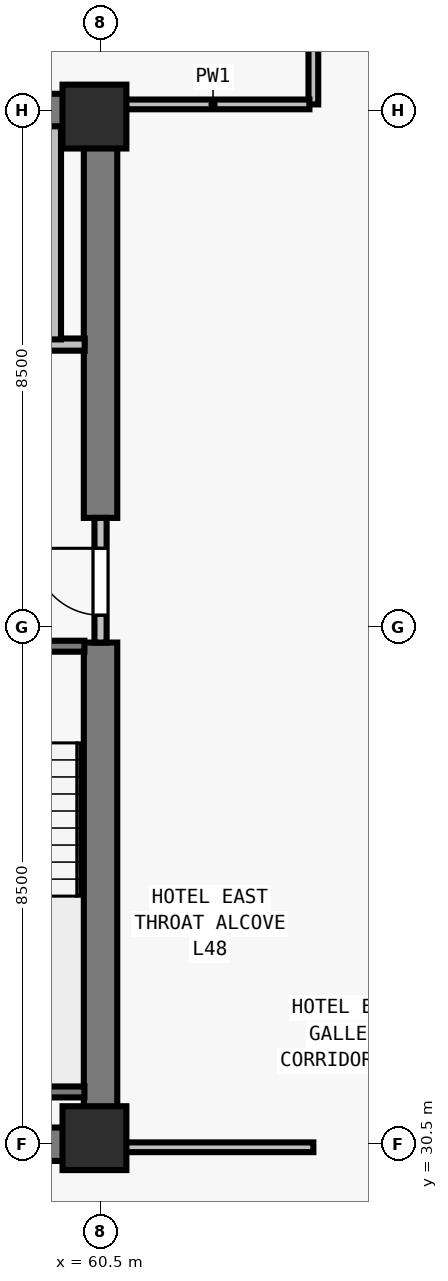
"""IFC4 building model, lengths in metres.
Left out: names, types, materials, properties, quantities, classifications, styles, units other than length and angle.
Written with IfcOpenShell. Run it as: python <this file> out.ifc"""

import sys

from ifc_helpers import new_model, si_unit, direction, frame, frame_2d, origin, origin_2d, place, context, subcontext, project, spatial, rectangle, extrude, element, fill, save


model = new_model("IFC4")
c1 = context("Model", 3, precision=1e-05, world=origin(), true_north=direction((0.0, 1.0)))
c2 = subcontext(c1, "Body", "Model", "MODEL_VIEW")
j1 = project(units=[si_unit("LENGTHUNIT", "METRE"), si_unit("PLANEANGLEUNIT", "RADIAN")], contexts=[c1])
p1 = place(None, origin())
s1 = spatial("IfcSite", under=j1, at=p1, CompositionType="ELEMENT")
p2 = place(p1, origin())
s2 = spatial("IfcBuilding", under=s1, at=p2, CompositionType="ELEMENT")
p3 = place(p2, frame((0.0, 0.0, 176.0)))
s3 = spatial("IfcBuildingStorey", under=s2, at=p3, CompositionType="ELEMENT", Elevation=176.0)
for number, where, z_axis, x_axis in (
    (1, (60.4, 30.6, 0.0), (0.0, 0.0, 1.0), (1.0, 0.0, 0.0)),
    (2, (60.4, 47.4, 0.0), (0.0, 0.0, 1.0), (1.0, 0.0, 0.0)),
):
    element("IfcColumn", number, at=place(p3, frame(where, z_axis=z_axis, x_axis=x_axis)), inside=s3, PredefinedType="COLUMN", context=c2, shape_type="SweptSolid", body=[
        extrude(rectangle(XDim=1.05, YDim=1.05, at=origin_2d()), origin(), (0.0, 0.0, 1.0), 3.5),
    ])
for number, where, z_axis, x_axis in (
    (3, (43.225, 30.5, 0.0), (0.0, 0.0, 1.0), (1.0, 0.0, 0.0)),
    (4, (43.225, 47.5, 0.0), (0.0, 0.0, 1.0), (1.0, 0.0, 0.0)),
):
    element("IfcWall", number, at=place(p3, frame(where, z_axis=z_axis, x_axis=x_axis)), inside=s3, PredefinedType="SHEAR", context=c2, shape_type="SweptSolid", body=[
        extrude(rectangle(XDim=17.55, YDim=0.55, at=frame_2d((8.775, 0.0))), origin(), (0.0, 0.0, 1.0), 3.28),
    ])
p4 = place(p3, frame((60.5, 30.765, 0.0), z_axis=(0.0, 0.0, 1.0), x_axis=(0.0, 1.0, 0.0)))
e5 = element("IfcWall", 5, at=p4, inside=s3, PredefinedType="SHEAR", context=c2, shape_type="SweptSolid", body=[
    extrude(rectangle(XDim=7.985, YDim=0.55, at=frame_2d((3.993, 0.0))), origin(), (0.0, 0.0, 1.0), 3.28),
])
p5 = place(p3, frame((60.5, 40.8, 0.0), z_axis=(0.0, 0.0, 1.0), x_axis=(0.0, 1.0, 0.0)))
e6 = element("IfcWall", 6, at=p5, inside=s3, PredefinedType="SHEAR", context=c2, shape_type="SweptSolid", body=[
    extrude(rectangle(XDim=6.435, YDim=0.55, at=frame_2d((3.218, 0.0))), origin(), (0.0, 0.0, 1.0), 3.28),
])
p6 = place(p3, frame((60.5, 38.75, 0.0), z_axis=(0.0, 0.0, 1.0), x_axis=(0.0, 1.0, 0.0)))
e7 = element("IfcWall", 7, at=p6, inside=s3, PredefinedType="SOLIDWALL", context=c2, shape_type="SweptSolid", body=[
    extrude(rectangle(XDim=2.05, YDim=0.2, at=frame_2d((1.025, 0.0))), origin(), (0.0, 0.0, 1.0), 3.28),
])
p7 = place(p6, frame((0.45, 0.0, 0.0)))
e8 = element("IfcOpeningElement", 8, at=p7, cuts=e7, PredefinedType="OPENING", context=c2, shape_type="SweptSolid", body=[
    extrude(rectangle(XDim=1.1, YDim=2.15, at=frame_2d((0.55, 1.075))), frame((0.0, 0.11, 0.0), z_axis=(0.0, -1.0, 0.0), x_axis=(1.0, 0.0, 0.0)), (0.0, 0.0, 1.0), 0.22),
])
p8 = place(p3, frame((56.735, 43.65, 0.0), z_axis=(0.0, 0.0, 1.0), x_axis=(1.0, 0.0, 0.0)))
e9 = element("IfcWall", 9, at=p8, inside=s3, PredefinedType="SOLIDWALL", context=c2, shape_type="SweptSolid", body=[
    extrude(rectangle(XDim=3.505, YDim=0.2, at=frame_2d((1.752, 0.0))), origin(), (0.0, 0.0, 1.0), 3.28),
])
p9 = place(p8, frame((1.295, 0.0, 0.0)))
e10 = element("IfcOpeningElement", 10, at=p9, cuts=e9, PredefinedType="OPENING", context=c2, shape_type="SweptSolid", body=[
    extrude(rectangle(XDim=1.1, YDim=2.2, at=frame_2d((0.55, 1.1))), frame((0.0, 0.11, 0.0), z_axis=(0.0, -1.0, 0.0), x_axis=(1.0, 0.0, 0.0)), (0.0, 0.0, 1.0), 0.22),
])
p10 = place(p3, frame((59.75, 43.735, 0.0), z_axis=(0.0, 0.0, 1.0), x_axis=(0.0, 1.0, 0.0)))
e11 = element("IfcWall", 11, at=p10, inside=s3, PredefinedType="SOLIDWALL", context=c2, shape_type="SweptSolid", body=[
    extrude(rectangle(XDim=3.505, YDim=0.2, at=frame_2d((1.752, 0.0))), origin(), (0.0, 0.0, 1.0), 3.28),
])
p11 = place(p3, frame((64.0, 47.6, 0.0), z_axis=(0.0, 0.0, 1.0), x_axis=(0.0, 1.0, 0.0)))
e12 = element("IfcWall", 12, at=p11, inside=s3, PredefinedType="PARTITIONING", context=c2, shape_type="SweptSolid", body=[
    extrude(rectangle(XDim=15.075, YDim=0.16, at=frame_2d((7.538, 0.0))), origin(), (0.0, 0.0, 1.0), 2.555),
])
p12 = place(p11, frame((3.5, 0.0, 0.0)))
e13 = element("IfcOpeningElement", 13, at=p12, cuts=e12, PredefinedType="OPENING", context=c2, shape_type="SweptSolid", body=[
    extrude(rectangle(XDim=0.96, YDim=2.12, at=frame_2d((0.48, 1.06))), frame((0.0, 0.09, 0.0), z_axis=(0.0, -1.0, 0.0), x_axis=(1.0, 0.0, 0.0)), (0.0, 0.0, 1.0), 0.18),
])
p13 = place(p3, frame((60.765, 30.45, 0.0), z_axis=(0.0, 0.0, 1.0), x_axis=(1.0, 0.0, 0.0)))
e14 = element("IfcWall", 14, at=p13, inside=s3, PredefinedType="PARTITIONING", context=c2, shape_type="SweptSolid", body=[
    extrude(rectangle(XDim=3.235, YDim=0.16, at=frame_2d((1.618, 0.0))), origin(), (0.0, 0.0, 1.0), 3.28),
])
p14 = place(p3, frame((60.765, 47.6, 0.0), z_axis=(0.0, 0.0, 1.0), x_axis=(1.0, 0.0, 0.0)))
e15 = element("IfcWall", 15, at=p14, inside=s3, PredefinedType="PARTITIONING", context=c2, shape_type="SweptSolid", body=[
    extrude(rectangle(XDim=3.17, YDim=0.16, at=frame_2d((1.585, 0.0))), origin(), (0.0, 0.0, 1.0), 3.28),
])
p15 = place(p3, frame((57.005, 38.69, 0.0), z_axis=(0.0, 0.0, 1.0), x_axis=(1.0, 0.0, 0.0)))
e16 = element("IfcWall", 16, at=p15, inside=s3, PredefinedType="SOLIDWALL", context=c2, shape_type="SweptSolid", body=[
    extrude(rectangle(XDim=3.23, YDim=0.18, at=frame_2d((1.615, 0.0))), origin(), (0.0, 0.0, 1.0), 3.28),
])
p16 = place(p15, frame((1.14, 0.0, 0.0)))
e17 = element("IfcOpeningElement", 17, at=p16, cuts=e16, PredefinedType="OPENING", context=c2, shape_type="SweptSolid", body=[
    extrude(rectangle(XDim=0.95, YDim=2.15, at=frame_2d((0.475, 1.075))), frame((0.0, 0.1, 0.0), z_axis=(0.0, -1.0, 0.0), x_axis=(1.0, 0.0, 0.0)), (0.0, 0.0, 1.0), 0.2),
])
p17 = place(p3, frame((57.005, 31.36, 0.0), z_axis=(0.0, 0.0, 1.0), x_axis=(1.0, 0.0, 0.0)))
e18 = element("IfcWall", 18, at=p17, inside=s3, PredefinedType="SOLIDWALL", context=c2, shape_type="SweptSolid", body=[
    extrude(rectangle(XDim=3.23, YDim=0.18, at=frame_2d((1.615, 0.0))), origin(), (0.0, 0.0, 1.0), 3.28),
])
p18 = place(p7, origin())
e19 = element("IfcDoor", 19, at=p18, inside=s3, OperationType="SINGLE_SWING_RIGHT", PredefinedType="DOOR", context=c2, shape_type="SweptSolid", body=[
    extrude(rectangle(XDim=1.1, YDim=2.15, at=frame_2d((0.55, 1.075))), frame((0.0, 0.025, 0.0), z_axis=(0.0, -1.0, 0.0), x_axis=(1.0, 0.0, 0.0)), (0.0, 0.0, 1.0), 0.05),
])
fill(e8, e19)
save(model, sys.argv[1])
